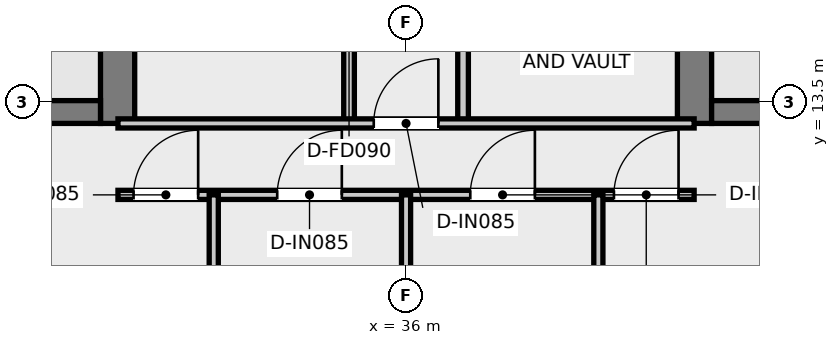
"""IFC4 building model, lengths in metres.
Left out: names, types, materials, properties, quantities, classifications, styles, units other than length and angle.
Written with IfcOpenShell. Run it as: python <this file> out.ifc"""

import sys

from ifc_helpers import new_model, si_unit, direction, frame, frame_2d, origin, place, context, subcontext, project, spatial, rectangle, extrude, element, fill, save


model = new_model("IFC4")
c1 = context("Model", 3, precision=1e-05, world=origin(), true_north=direction((0.0, 1.0)))
c2 = subcontext(c1, "Body", "Model", "MODEL_VIEW")
j1 = project(units=[si_unit("LENGTHUNIT", "METRE"), si_unit("PLANEANGLEUNIT", "RADIAN")], contexts=[c1])
p1 = place(None, origin())
s1 = spatial("IfcSite", under=j1, at=p1, CompositionType="ELEMENT")
p2 = place(p1, origin())
s2 = spatial("IfcBuilding", under=s1, at=p2, CompositionType="ELEMENT")
p3 = place(p2, frame((0.0, 0.0, 318.75)))
s3 = spatial("IfcBuildingStorey", under=s2, at=p3, CompositionType="ELEMENT", Elevation=318.75)
p4 = place(p3, frame((32.205, 13.22, 0.0), z_axis=(0.0, 0.0, 1.0), x_axis=(0.0, 1.0, 0.0)))
e1 = element("IfcWall", 1, at=p4, inside=s3, PredefinedType="SHEAR", context=c2, shape_type="SweptSolid", body=[
    extrude(rectangle(XDim=12.78, YDim=0.45, at=frame_2d((6.39, 0.0))), origin(), (0.0, 0.0, 1.0), 5.0),
])
p5 = place(p4, frame((10.58, 0.0, 0.0)))
e2 = element("IfcOpeningElement", 2, at=p5, cuts=e1, PredefinedType="OPENING", context=c2, shape_type="SweptSolid", body=[
    extrude(rectangle(XDim=1.1, YDim=2.15, at=frame_2d((0.55, 1.075))), frame((0.0, 0.235, 0.0), z_axis=(0.0, -1.0, 0.0), x_axis=(1.0, 0.0, 0.0)), (0.0, 0.0, 1.0), 0.47),
])
p6 = place(p3, frame((39.795, 13.22, 0.0), z_axis=(0.0, 0.0, 1.0), x_axis=(0.0, 1.0, 0.0)))
e3 = element("IfcWall", 3, at=p6, inside=s3, PredefinedType="SHEAR", context=c2, shape_type="SweptSolid", body=[
    extrude(rectangle(XDim=12.78, YDim=0.45, at=frame_2d((6.39, 0.0))), origin(), (0.0, 0.0, 1.0), 5.0),
])
p7 = place(p6, frame((10.58, 0.0, 0.0)))
e4 = element("IfcOpeningElement", 4, at=p7, cuts=e3, PredefinedType="OPENING", context=c2, shape_type="SweptSolid", body=[
    extrude(rectangle(XDim=1.1, YDim=2.15, at=frame_2d((0.55, 1.075))), frame((0.0, 0.235, 0.0), z_axis=(0.0, -1.0, 0.0), x_axis=(1.0, 0.0, 0.0)), (0.0, 0.0, 1.0), 0.47),
])
for number, where, z_axis, x_axis in (
    (5, (28.88, 13.37, 0.0), (0.0, 0.0, 1.0), (1.0, 0.0, 0.0)),
    (6, (40.02, 13.37, 0.0), (0.0, 0.0, 1.0), (1.0, 0.0, 0.0)),
):
    element("IfcWall", number, at=place(p3, frame(where, z_axis=z_axis, x_axis=x_axis)), inside=s3, PredefinedType="SHEAR", context=c2, shape_type="SweptSolid", body=[
        extrude(rectangle(XDim=3.1, YDim=0.3, at=frame_2d((1.55, 0.0))), origin(), (0.0, 0.0, 1.0), 5.0),
    ])
p8 = place(p3, frame((35.25, 13.22, 0.0), z_axis=(0.0, 0.0, 1.0), x_axis=(0.0, 1.0, 0.0)))
e7 = element("IfcWall", 7, at=p8, inside=s3, PredefinedType="PARTITIONING", context=c2, shape_type="SweptSolid", body=[
    extrude(rectangle(XDim=4.56, YDim=0.14, at=frame_2d((2.28, 0.0))), origin(), (0.0, 0.0, 1.0), 4.72),
])
p9 = place(p8, frame((1.93, 0.0, 0.0)))
e8 = element("IfcOpeningElement", 8, at=p9, cuts=e7, PredefinedType="OPENING", context=c2, shape_type="SweptSolid", body=[
    extrude(rectangle(XDim=0.9, YDim=2.1, at=frame_2d((0.45, 1.05))), frame((0.0, 0.08, 0.0), z_axis=(0.0, -1.0, 0.0), x_axis=(1.0, 0.0, 0.0)), (0.0, 0.0, 1.0), 0.16),
])
p10 = place(p3, frame((36.75, 13.22, 0.0), z_axis=(0.0, 0.0, 1.0), x_axis=(0.0, 1.0, 0.0)))
e9 = element("IfcWall", 9, at=p10, inside=s3, PredefinedType="PARTITIONING", context=c2, shape_type="SweptSolid", body=[
    extrude(rectangle(XDim=4.56, YDim=0.14, at=frame_2d((2.28, 0.0))), origin(), (0.0, 0.0, 1.0), 4.72),
])
p11 = place(p10, frame((1.93, 0.0, 0.0)))
e10 = element("IfcOpeningElement", 10, at=p11, cuts=e9, PredefinedType="OPENING", context=c2, shape_type="SweptSolid", body=[
    extrude(rectangle(XDim=0.9, YDim=2.1, at=frame_2d((0.45, 1.05))), frame((0.0, 0.08, 0.0), z_axis=(0.0, -1.0, 0.0), x_axis=(1.0, 0.0, 0.0)), (0.0, 0.0, 1.0), 0.16),
])
p12 = place(p3, frame((32.21, 13.22, 0.0), z_axis=(0.0, 0.0, 1.0), x_axis=(1.0, 0.0, 0.0)))
e11 = element("IfcWall", 11, at=p12, inside=s3, PredefinedType="PARTITIONING", context=c2, shape_type="SweptSolid", body=[
    extrude(rectangle(XDim=7.58, YDim=0.12, at=frame_2d((3.79, 0.0))), origin(), (0.0, 0.0, 1.0), 4.72),
])
p13 = place(p12, frame((3.365, 0.0, 0.0)))
e12 = element("IfcOpeningElement", 12, at=p13, cuts=e11, PredefinedType="OPENING", context=c2, shape_type="SweptSolid", body=[
    extrude(rectangle(XDim=0.85, YDim=2.1, at=frame_2d((0.425, 1.05))), frame((0.0, 0.07, 0.0), z_axis=(0.0, -1.0, 0.0), x_axis=(1.0, 0.0, 0.0)), (0.0, 0.0, 1.0), 0.14),
])
p14 = place(p3, frame((32.21, 12.28, 0.0), z_axis=(0.0, 0.0, 1.0), x_axis=(1.0, 0.0, 0.0)))
e13 = element("IfcWall", 13, at=p14, inside=s3, PredefinedType="PARTITIONING", context=c2, shape_type="SweptSolid", body=[
    extrude(rectangle(XDim=7.58, YDim=0.12, at=frame_2d((3.79, 0.0))), origin(), (0.0, 0.0, 1.0), 4.72),
])
p15 = place(p14, frame((0.205, 0.0, 0.0)))
e14 = element("IfcOpeningElement", 14, at=p15, cuts=e13, PredefinedType="OPENING", context=c2, shape_type="SweptSolid", body=[
    extrude(rectangle(XDim=0.85, YDim=2.1, at=frame_2d((0.425, 1.05))), frame((0.0, 0.07, 0.0), z_axis=(0.0, -1.0, 0.0), x_axis=(1.0, 0.0, 0.0)), (0.0, 0.0, 1.0), 0.14),
])
p16 = place(p14, frame((2.095, 0.0, 0.0)))
e15 = element("IfcOpeningElement", 15, at=p16, cuts=e13, PredefinedType="OPENING", context=c2, shape_type="SweptSolid", body=[
    extrude(rectangle(XDim=0.85, YDim=2.1, at=frame_2d((0.425, 1.05))), frame((0.0, 0.07, 0.0), z_axis=(0.0, -1.0, 0.0), x_axis=(1.0, 0.0, 0.0)), (0.0, 0.0, 1.0), 0.14),
])
p17 = place(p14, frame((4.635, 0.0, 0.0)))
e16 = element("IfcOpeningElement", 16, at=p17, cuts=e13, PredefinedType="OPENING", context=c2, shape_type="SweptSolid", body=[
    extrude(rectangle(XDim=0.85, YDim=2.1, at=frame_2d((0.425, 1.05))), frame((0.0, 0.07, 0.0), z_axis=(0.0, -1.0, 0.0), x_axis=(1.0, 0.0, 0.0)), (0.0, 0.0, 1.0), 0.14),
])
p18 = place(p14, frame((6.525, 0.0, 0.0)))
e17 = element("IfcOpeningElement", 17, at=p18, cuts=e13, PredefinedType="OPENING", context=c2, shape_type="SweptSolid", body=[
    extrude(rectangle(XDim=0.85, YDim=2.1, at=frame_2d((0.425, 1.05))), frame((0.0, 0.07, 0.0), z_axis=(0.0, -1.0, 0.0), x_axis=(1.0, 0.0, 0.0)), (0.0, 0.0, 1.0), 0.14),
])
for number, where, z_axis, x_axis in (
    (18, (33.47, 11.25, 0.0), (0.0, 0.0, 1.0), (0.0, 1.0, 0.0)),
    (19, (36.0, 11.25, 0.0), (0.0, 0.0, 1.0), (0.0, 1.0, 0.0)),
    (20, (38.53, 11.25, 0.0), (0.0, 0.0, 1.0), (0.0, 1.0, 0.0)),
):
    element("IfcWall", number, at=place(p3, frame(where, z_axis=z_axis, x_axis=x_axis)), inside=s3, PredefinedType="PARTITIONING", context=c2, shape_type="SweptSolid", body=[
        extrude(rectangle(XDim=1.03, YDim=0.12, at=frame_2d((0.515, 0.0))), origin(), (0.0, 0.0, 1.0), 4.72),
    ])
p19 = place(p13, origin())
e21 = element("IfcDoor", 21, at=p19, inside=s3, OperationType="SINGLE_SWING_RIGHT", PredefinedType="DOOR", context=c2, shape_type="SweptSolid", body=[
    extrude(rectangle(XDim=0.85, YDim=2.1, at=frame_2d((0.425, 1.05))), frame((0.0, 0.025, 0.0), z_axis=(0.0, -1.0, 0.0), x_axis=(1.0, 0.0, 0.0)), (0.0, 0.0, 1.0), 0.05),
])
fill(e12, e21)
p20 = place(p15, origin())
e22 = element("IfcDoor", 22, at=p20, inside=s3, OperationType="SINGLE_SWING_RIGHT", PredefinedType="DOOR", context=c2, shape_type="SweptSolid", body=[
    extrude(rectangle(XDim=0.85, YDim=2.1, at=frame_2d((0.425, 1.05))), frame((0.0, 0.025, 0.0), z_axis=(0.0, -1.0, 0.0), x_axis=(1.0, 0.0, 0.0)), (0.0, 0.0, 1.0), 0.05),
])
fill(e14, e22)
p21 = place(p16, origin())
e23 = element("IfcDoor", 23, at=p21, inside=s3, OperationType="SINGLE_SWING_RIGHT", PredefinedType="DOOR", context=c2, shape_type="SweptSolid", body=[
    extrude(rectangle(XDim=0.85, YDim=2.1, at=frame_2d((0.425, 1.05))), frame((0.0, 0.025, 0.0), z_axis=(0.0, -1.0, 0.0), x_axis=(1.0, 0.0, 0.0)), (0.0, 0.0, 1.0), 0.05),
])
fill(e15, e23)
p22 = place(p17, origin())
e24 = element("IfcDoor", 24, at=p22, inside=s3, OperationType="SINGLE_SWING_RIGHT", PredefinedType="DOOR", context=c2, shape_type="SweptSolid", body=[
    extrude(rectangle(XDim=0.85, YDim=2.1, at=frame_2d((0.425, 1.05))), frame((0.0, 0.025, 0.0), z_axis=(0.0, -1.0, 0.0), x_axis=(1.0, 0.0, 0.0)), (0.0, 0.0, 1.0), 0.05),
])
fill(e16, e24)
p23 = place(p18, origin())
e25 = element("IfcDoor", 25, at=p23, inside=s3, OperationType="SINGLE_SWING_RIGHT", PredefinedType="DOOR", context=c2, shape_type="SweptSolid", body=[
    extrude(rectangle(XDim=0.85, YDim=2.1, at=frame_2d((0.425, 1.05))), frame((0.0, 0.025, 0.0), z_axis=(0.0, -1.0, 0.0), x_axis=(1.0, 0.0, 0.0)), (0.0, 0.0, 1.0), 0.05),
])
fill(e17, e25)
save(model, sys.argv[1])
